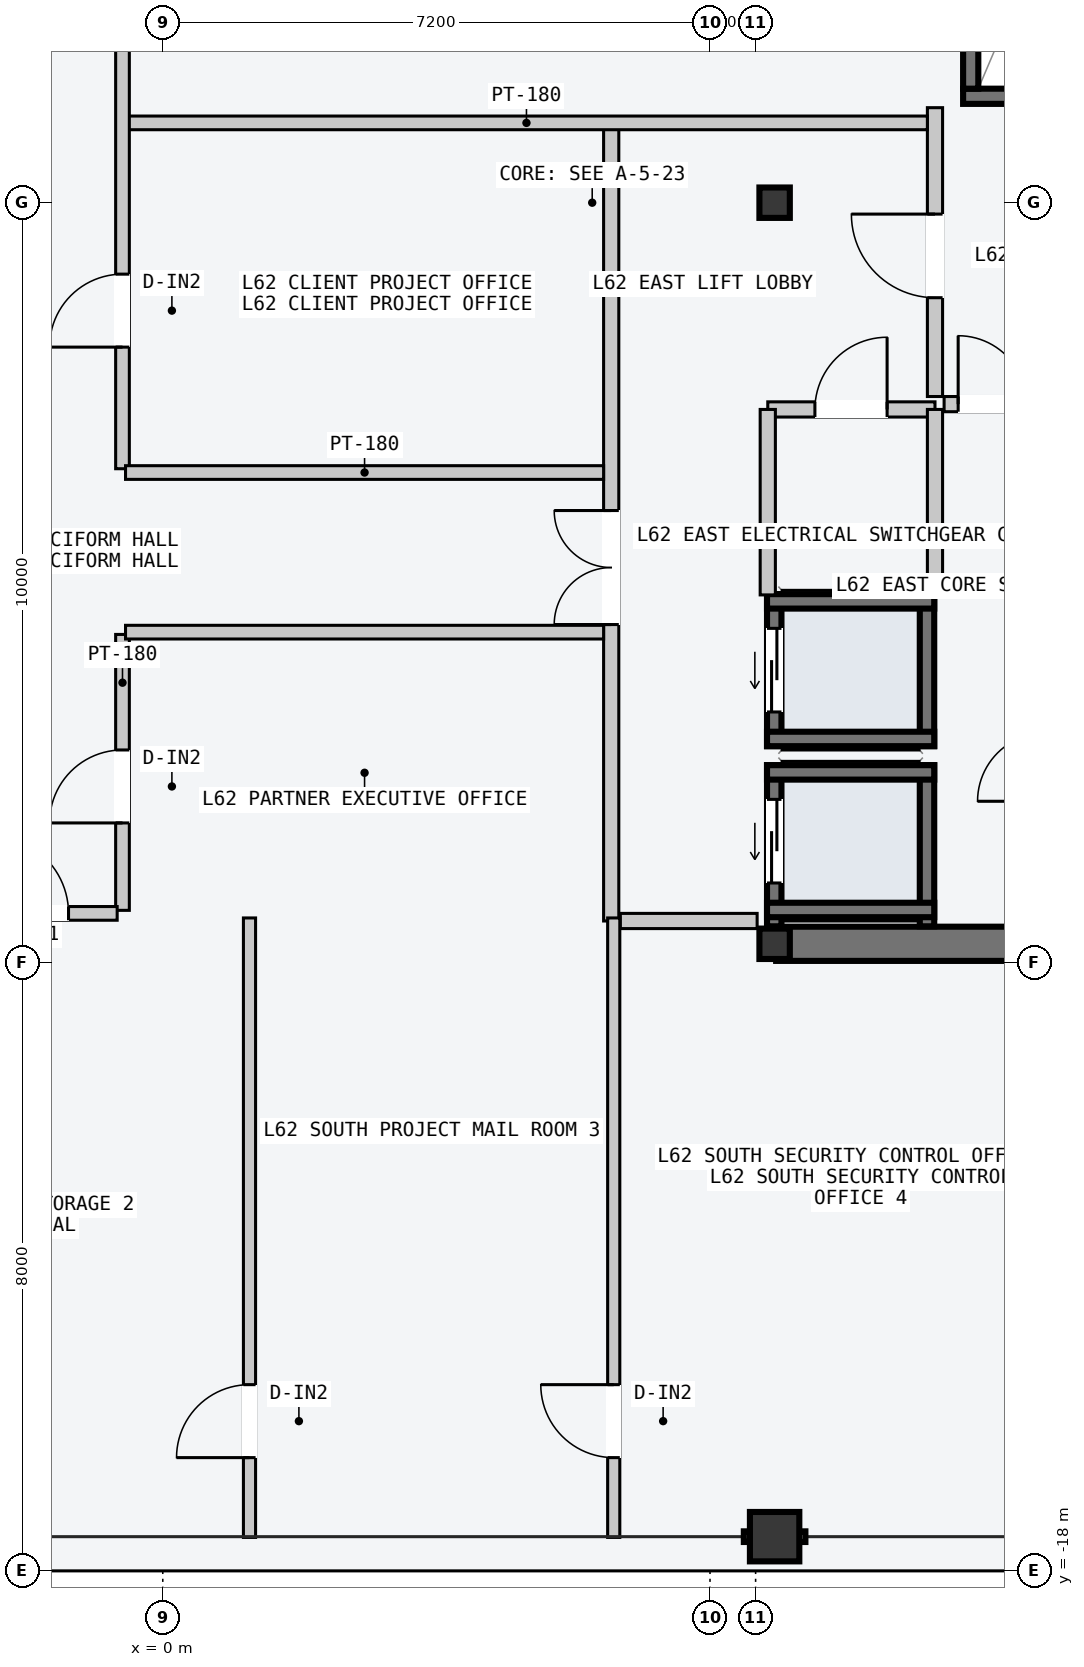
"""IFC4 building model, lengths in metres.
Left out: names, types, materials, properties, quantities, classifications, styles, units other than length and angle.
Written with IfcOpenShell. Run it as: python <this file> out.ifc"""

import sys

from ifc_helpers import new_model, si_unit, direction, frame, frame_2d, origin, origin_2d, place, context, subcontext, project, spatial, rectangle, hollow_rectangle, i_section, extrude, element, fill, save


model = new_model("IFC4")
c1 = context("Model", 3, precision=1e-05, world=origin(), true_north=direction((0.0, 1.0)))
c2 = subcontext(c1, "Body", "Model", "MODEL_VIEW")
j1 = project(units=[si_unit("LENGTHUNIT", "METRE"), si_unit("PLANEANGLEUNIT", "RADIAN")], contexts=[c1])
p1 = place(None, origin())
s1 = spatial("IfcSite", under=j1, at=p1, CompositionType="ELEMENT")
p2 = place(p1, origin())
s2 = spatial("IfcBuilding", under=s1, at=p2, CompositionType="ELEMENT")
p3 = place(p2, frame((0.0, 0.0, 236.4)))
s3 = spatial("IfcBuildingStorey", under=s2, at=p3, CompositionType="ELEMENT", Elevation=236.4)
p4 = place(p3, frame((8.07, -9.75, -0.2), z_axis=(0.0, 0.0, 1.0), x_axis=(1.0, 0.0, 0.0)))
e1 = element("IfcWall", 1, at=p4, inside=s3, PredefinedType="SHEAR", context=c2, shape_type="SweptSolid", body=[
    extrude(rectangle(XDim=6.46, YDim=0.45, at=frame_2d((3.23, 0.0))), origin(), (0.0, 0.0, 1.0), 3.6),
])
p5 = place(p3, frame((10.53, 1.4, -0.2), z_axis=(0.0, 0.0, 1.0), x_axis=(1.0, 0.0, 0.0)))
e2 = element("IfcWall", 2, at=p5, inside=s3, PredefinedType="SOLIDWALL", context=c2, shape_type="SweptSolid", body=[
    extrude(rectangle(XDim=3.72, YDim=0.2, at=frame_2d((1.86, 0.0))), origin(), (0.0, 0.0, 1.0), 3.6),
])
p6 = place(p5, frame((1.5, 0.0, 0.2)))
e3 = element("IfcOpeningElement", 3, at=p6, cuts=e2, PredefinedType="OPENING", context=c2, shape_type="SweptSolid", body=[
    extrude(rectangle(XDim=1.12, YDim=2.18, at=frame_2d((0.56, 1.09))), frame((0.0, 0.11, 0.0), z_axis=(0.0, -1.0, 0.0), x_axis=(1.0, 0.0, 0.0)), (0.0, 0.0, 1.0), 0.22),
])
p7 = place(p3, frame((10.63, 1.5, -0.2), z_axis=(0.0, 0.0, 1.0), x_axis=(0.0, 1.0, 0.0)))
e4 = element("IfcWall", 4, at=p7, inside=s3, PredefinedType="SOLIDWALL", context=c2, shape_type="SweptSolid", body=[
    extrude(rectangle(XDim=7.8, YDim=0.2, at=frame_2d((3.9, 0.0))), origin(), (0.0, 0.0, 1.0), 3.6),
])
for number, where, z_axis, x_axis in (
    (5, (8.05, -9.75, 0.0), (0.0, 0.0, 1.0), (1.0, 0.0, 0.0)),
    (6, (8.05, 0.0, 0.0), (0.0, 0.0, 1.0), (1.0, 0.0, 0.0)),
):
    element("IfcColumn", number, at=place(p3, frame(where, z_axis=z_axis, x_axis=x_axis)), inside=s3, PredefinedType="COLUMN", context=c2, shape_type="SweptSolid", body=[
        extrude(i_section(OverallWidth=0.4, OverallDepth=0.4, WebThickness=0.013, FlangeThickness=0.021, at=origin_2d()), origin(), (0.0, 0.0, 1.0), 3.6),
    ])
p8 = place(p3, frame((8.05, -17.55, 0.0), z_axis=(0.0, 0.0, 1.0), x_axis=(1.0, 0.0, 0.0)))
e7 = element("IfcColumn", 7, at=p8, inside=s3, PredefinedType="COLUMN", context=c2, shape_type="SweptSolid", body=[
    extrude(hollow_rectangle(XDim=0.65, YDim=0.65, WallThickness=0.028, at=origin_2d()), origin(), (0.0, 0.0, 1.0), 3.6),
])
p9 = place(p3, frame((8.045, -9.52, -0.2), z_axis=(0.0, 0.0, 1.0), x_axis=(0.0, 1.0, 0.0)))
e8 = element("IfcWall", 8, at=p9, inside=s3, PredefinedType="SOLIDWALL", context=c2, shape_type="SweptSolid", body=[
    extrude(rectangle(XDim=2.12, YDim=0.19, at=frame_2d((1.06, 0.0))), origin(), (0.0, 0.0, 1.0), 3.6),
])
p10 = place(p9, frame((0.57, 0.0, 0.2)))
e9 = element("IfcOpeningElement", 9, at=p10, cuts=e8, PredefinedType="OPENING", context=c2, shape_type="SweptSolid", body=[
    extrude(rectangle(XDim=1.1, YDim=2.2, at=frame_2d((0.55, 1.1))), frame((0.0, 0.105, 0.0), z_axis=(0.0, -1.0, 0.0), x_axis=(1.0, 0.0, 0.0)), (0.0, 0.0, 1.0), 0.21),
])
p11 = place(p3, frame((10.055, -9.52, -0.2), z_axis=(0.0, 0.0, 1.0), x_axis=(0.0, 1.0, 0.0)))
e10 = element("IfcWall", 10, at=p11, inside=s3, PredefinedType="SOLIDWALL", context=c2, shape_type="SweptSolid", body=[
    extrude(rectangle(XDim=2.12, YDim=0.19, at=frame_2d((1.06, 0.0))), origin(), (0.0, 0.0, 1.0), 3.6),
])
for number, where, z_axis, x_axis in (
    (11, (7.95, -7.495, -0.2), (0.0, 0.0, 1.0), (1.0, 0.0, 0.0)),
    (12, (7.95, -9.305, -0.2), (0.0, 0.0, 1.0), (1.0, 0.0, 0.0)),
):
    element("IfcWall", number, at=place(p3, frame(where, z_axis=z_axis, x_axis=x_axis)), inside=s3, PredefinedType="SOLIDWALL", context=c2, shape_type="SweptSolid", body=[
        extrude(rectangle(XDim=2.2, YDim=0.19, at=frame_2d((1.1, 0.0))), origin(), (0.0, 0.0, 1.0), 3.6),
    ])
p12 = place(p3, frame((8.045, -7.15, -0.2), z_axis=(0.0, 0.0, 1.0), x_axis=(0.0, 1.0, 0.0)))
e13 = element("IfcWall", 13, at=p12, inside=s3, PredefinedType="SOLIDWALL", context=c2, shape_type="SweptSolid", body=[
    extrude(rectangle(XDim=2.0, YDim=0.19, at=frame_2d((1.0, 0.0))), origin(), (0.0, 0.0, 1.0), 3.6),
])
p13 = place(p12, frame((0.45, 0.0, 0.2)))
e14 = element("IfcOpeningElement", 14, at=p13, cuts=e13, PredefinedType="OPENING", context=c2, shape_type="SweptSolid", body=[
    extrude(rectangle(XDim=1.1, YDim=2.2, at=frame_2d((0.55, 1.1))), frame((0.0, 0.105, 0.0), z_axis=(0.0, -1.0, 0.0), x_axis=(1.0, 0.0, 0.0)), (0.0, 0.0, 1.0), 0.21),
])
p14 = place(p3, frame((10.055, -7.15, -0.2), z_axis=(0.0, 0.0, 1.0), x_axis=(0.0, 1.0, 0.0)))
e15 = element("IfcWall", 15, at=p14, inside=s3, PredefinedType="SOLIDWALL", context=c2, shape_type="SweptSolid", body=[
    extrude(rectangle(XDim=2.0, YDim=0.19, at=frame_2d((1.0, 0.0))), origin(), (0.0, 0.0, 1.0), 3.6),
])
for number, where, z_axis, x_axis in (
    (16, (7.95, -5.245, -0.2), (0.0, 0.0, 1.0), (1.0, 0.0, 0.0)),
    (17, (7.95, -7.055, -0.2), (0.0, 0.0, 1.0), (1.0, 0.0, 0.0)),
):
    element("IfcWall", number, at=place(p3, frame(where, z_axis=z_axis, x_axis=x_axis)), inside=s3, PredefinedType="SOLIDWALL", context=c2, shape_type="SweptSolid", body=[
        extrude(rectangle(XDim=2.2, YDim=0.19, at=frame_2d((1.1, 0.0))), origin(), (0.0, 0.0, 1.0), 3.6),
    ])
p15 = place(p3, frame((5.9, -9.45, 0.0), z_axis=(0.0, 0.0, 1.0), x_axis=(0.0, 1.0, 0.0)))
e18 = element("IfcWall", 18, at=p15, inside=s3, PredefinedType="PARTITIONING", context=c2, shape_type="SweptSolid", body=[
    extrude(rectangle(XDim=10.5, YDim=0.2, at=frame_2d((5.25, 0.0))), origin(), (0.0, 0.0, 1.0), 3.4),
])
p16 = place(p15, frame((3.9, 0.0, 0.0)))
e19 = element("IfcOpeningElement", 19, at=p16, cuts=e18, PredefinedType="OPENING", context=c2, shape_type="SweptSolid", body=[
    extrude(rectangle(XDim=1.5, YDim=2.2, at=frame_2d((0.75, 1.1))), frame((0.0, 0.11, 0.0), z_axis=(0.0, -1.0, 0.0), x_axis=(1.0, 0.0, 0.0)), (0.0, 0.0, 1.0), 0.22),
])
p17 = place(p3, frame((6.02, -9.45, 0.0), z_axis=(0.0, 0.0, 1.0), x_axis=(1.0, 0.0, 0.0)))
e20 = element("IfcWall", 20, at=p17, inside=s3, PredefinedType="PARTITIONING", context=c2, shape_type="SweptSolid", body=[
    extrude(rectangle(XDim=1.8, YDim=0.2, at=frame_2d((0.9, 0.0))), origin(), (0.0, 0.0, 1.0), 3.4),
])
p18 = place(p3, frame((10.16, -2.55, 0.0), z_axis=(0.0, 0.0, 1.0), x_axis=(0.0, 1.0, 0.0)))
e21 = element("IfcWall", 21, at=p18, inside=s3, PredefinedType="PARTITIONING", context=c2, shape_type="SweptSolid", body=[
    extrude(rectangle(XDim=3.8, YDim=0.2, at=frame_2d((1.9, 0.0))), origin(), (0.0, 0.0, 1.0), 3.4),
])
p19 = place(p18, frame((1.3, 0.0, 0.0)))
e22 = element("IfcOpeningElement", 22, at=p19, cuts=e21, PredefinedType="OPENING", context=c2, shape_type="SweptSolid", body=[
    extrude(rectangle(XDim=1.1, YDim=2.15, at=frame_2d((0.55, 1.075))), frame((0.0, 0.11, 0.0), z_axis=(0.0, -1.0, 0.0), x_axis=(1.0, 0.0, 0.0)), (0.0, 0.0, 1.0), 0.22),
])
p20 = place(p3, frame((10.28, -2.65, 0.0), z_axis=(0.0, 0.0, 1.0), x_axis=(1.0, 0.0, 0.0)))
e23 = element("IfcWall", 23, at=p20, inside=s3, PredefinedType="PARTITIONING", context=c2, shape_type="SweptSolid", body=[
    extrude(rectangle(XDim=1.27, YDim=0.2, at=frame_2d((0.635, 0.0))), origin(), (0.0, 0.0, 1.0), 3.4),
])
p21 = place(p20, frame((0.185, 0.0, 0.0)))
e24 = element("IfcOpeningElement", 24, at=p21, cuts=e23, PredefinedType="OPENING", context=c2, shape_type="SweptSolid", body=[
    extrude(rectangle(XDim=0.9, YDim=2.15, at=frame_2d((0.45, 1.075))), frame((0.0, 0.11, 0.0), z_axis=(0.0, -1.0, 0.0), x_axis=(1.0, 0.0, 0.0)), (0.0, 0.0, 1.0), 0.22),
])
p22 = place(p3, frame((7.96, -2.72, 0.0), z_axis=(0.0, 0.0, 1.0), x_axis=(1.0, 0.0, 0.0)))
e25 = element("IfcWall", 25, at=p22, inside=s3, PredefinedType="PARTITIONING", context=c2, shape_type="SweptSolid", body=[
    extrude(rectangle(XDim=2.2, YDim=0.2, at=frame_2d((1.1, 0.0))), origin(), (0.0, 0.0, 1.0), 3.4),
])
p23 = place(p22, frame((0.62, 0.0, 0.0)))
e26 = element("IfcOpeningElement", 26, at=p23, cuts=e25, PredefinedType="OPENING", context=c2, shape_type="SweptSolid", body=[
    extrude(rectangle(XDim=0.95, YDim=2.1, at=frame_2d((0.475, 1.05))), frame((0.0, 0.11, 0.0), z_axis=(0.0, -1.0, 0.0), x_axis=(1.0, 0.0, 0.0)), (0.0, 0.0, 1.0), 0.22),
])
for number, where, z_axis, x_axis in (
    (27, (7.96, -5.16, 0.0), (0.0, 0.0, 1.0), (0.0, 1.0, 0.0)),
    (28, (10.16, -5.16, 0.0), (0.0, 0.0, 1.0), (0.0, 1.0, 0.0)),
):
    element("IfcWall", number, at=place(p3, frame(where, z_axis=z_axis, x_axis=x_axis)), inside=s3, PredefinedType="PARTITIONING", context=c2, shape_type="SweptSolid", body=[
        extrude(rectangle(XDim=2.44, YDim=0.2, at=frame_2d((1.22, 0.0))), origin(), (0.0, 0.0, 1.0), 3.4),
    ])
p24 = place(p3, frame((-0.49, 1.05, 0.0), z_axis=(0.0, 0.0, 1.0), x_axis=(1.0, 0.0, 0.0)))
e29 = element("IfcWall", 29, at=p24, inside=s3, PredefinedType="PARTITIONING", context=c2, shape_type="SweptSolid", body=[
    extrude(rectangle(XDim=10.55, YDim=0.18, at=frame_2d((5.275, 0.0))), origin(), (0.0, 0.0, 1.0), 3.4),
])
p25 = place(p3, frame((-0.53, -3.5, 0.0), z_axis=(0.0, 0.0, 1.0), x_axis=(0.0, 1.0, 0.0)))
e30 = element("IfcWall", 30, at=p25, inside=s3, PredefinedType="PARTITIONING", context=c2, shape_type="SweptSolid", body=[
    extrude(rectangle(XDim=13.67, YDim=0.18, at=frame_2d((6.835, 0.0))), origin(), (0.0, 0.0, 1.0), 3.4),
])
p26 = place(p25, frame((6.1, 0.0, 0.0)))
e31 = element("IfcOpeningElement", 31, at=p26, cuts=e30, PredefinedType="OPENING", context=c2, shape_type="SweptSolid", body=[
    extrude(rectangle(XDim=1.24, YDim=2.24, at=frame_2d((0.62, 1.12))), frame((0.0, 0.1, 0.0), z_axis=(0.0, -1.0, 0.0), x_axis=(1.0, 0.0, 0.0)), (0.0, 0.0, 1.0), 0.2),
])
p27 = place(p25, frame((1.6, 0.0, 0.0)))
e32 = element("IfcOpeningElement", 32, at=p27, cuts=e30, PredefinedType="OPENING", context=c2, shape_type="SweptSolid", body=[
    extrude(rectangle(XDim=0.96, YDim=2.18, at=frame_2d((0.48, 1.09))), frame((0.0, 0.1, 0.0), z_axis=(0.0, -1.0, 0.0), x_axis=(1.0, 0.0, 0.0)), (0.0, 0.0, 1.0), 0.2),
])
p28 = place(p3, frame((-0.49, -3.55, 0.0), z_axis=(0.0, 0.0, 1.0), x_axis=(1.0, 0.0, 0.0)))
e33 = element("IfcWall", 33, at=p28, inside=s3, PredefinedType="PARTITIONING", context=c2, shape_type="SweptSolid", body=[
    extrude(rectangle(XDim=6.29, YDim=0.18, at=frame_2d((3.145, 0.0))), origin(), (0.0, 0.0, 1.0), 3.4),
])
p29 = place(p3, frame((-0.53, -9.31, 0.0), z_axis=(0.0, 0.0, 1.0), x_axis=(0.0, 1.0, 0.0)))
e34 = element("IfcWall", 34, at=p29, inside=s3, PredefinedType="PARTITIONING", context=c2, shape_type="SweptSolid", body=[
    extrude(rectangle(XDim=3.63, YDim=0.18, at=frame_2d((1.815, 0.0))), origin(), (0.0, 0.0, 1.0), 3.4),
])
p30 = place(p29, frame((1.15, 0.0, 0.0)))
e35 = element("IfcOpeningElement", 35, at=p30, cuts=e34, PredefinedType="OPENING", context=c2, shape_type="SweptSolid", body=[
    extrude(rectangle(XDim=0.96, YDim=2.18, at=frame_2d((0.48, 1.09))), frame((0.0, 0.1, 0.0), z_axis=(0.0, -1.0, 0.0), x_axis=(1.0, 0.0, 0.0)), (0.0, 0.0, 1.0), 0.2),
])
p31 = place(p3, frame((-0.49, -5.65, 0.0), z_axis=(0.0, 0.0, 1.0), x_axis=(1.0, 0.0, 0.0)))
e36 = element("IfcWall", 36, at=p31, inside=s3, PredefinedType="PARTITIONING", context=c2, shape_type="SweptSolid", body=[
    extrude(rectangle(XDim=6.29, YDim=0.18, at=frame_2d((3.145, 0.0))), origin(), (0.0, 0.0, 1.0), 3.4),
])
p32 = place(p3, frame((1.141, -17.56, 0.0), z_axis=(0.0, 0.0, 1.0), x_axis=(0.0, 1.0, 0.0)))
e37 = element("IfcWall", 37, at=p32, inside=s3, PredefinedType="PARTITIONING", context=c2, shape_type="SweptSolid", body=[
    extrude(rectangle(XDim=8.15, YDim=0.16, at=frame_2d((4.075, 0.0))), origin(), (0.0, 0.0, 1.0), 3.4),
])
p33 = place(p32, frame((1.05, 0.0, 0.0)))
e38 = element("IfcOpeningElement", 38, at=p33, cuts=e37, PredefinedType="OPENING", context=c2, shape_type="SweptSolid", body=[
    extrude(rectangle(XDim=0.96, YDim=2.18, at=frame_2d((0.48, 1.09))), frame((0.0, 0.09, 0.0), z_axis=(0.0, -1.0, 0.0), x_axis=(1.0, 0.0, 0.0)), (0.0, 0.0, 1.0), 0.18),
])
p34 = place(p3, frame((5.933, -17.56, 0.0), z_axis=(0.0, 0.0, 1.0), x_axis=(0.0, 1.0, 0.0)))
e39 = element("IfcWall", 39, at=p34, inside=s3, PredefinedType="PARTITIONING", context=c2, shape_type="SweptSolid", body=[
    extrude(rectangle(XDim=8.15, YDim=0.16, at=frame_2d((4.075, 0.0))), origin(), (0.0, 0.0, 1.0), 3.4),
])
p35 = place(p34, frame((1.05, 0.0, 0.0)))
e40 = element("IfcOpeningElement", 40, at=p35, cuts=e39, PredefinedType="OPENING", context=c2, shape_type="SweptSolid", body=[
    extrude(rectangle(XDim=0.96, YDim=2.18, at=frame_2d((0.48, 1.09))), frame((0.0, 0.09, 0.0), z_axis=(0.0, -1.0, 0.0), x_axis=(1.0, 0.0, 0.0)), (0.0, 0.0, 1.0), 0.18),
])
p36 = place(p3, frame((-2.9, -9.35, 0.0), z_axis=(0.0, 0.0, 1.0), x_axis=(1.0, 0.0, 0.0)))
e41 = element("IfcWall", 41, at=p36, inside=s3, PredefinedType="PARTITIONING", context=c2, shape_type="SweptSolid", body=[
    extrude(rectangle(XDim=2.3, YDim=0.18, at=frame_2d((1.15, 0.0))), origin(), (0.0, 0.0, 1.0), 3.4),
])
p37 = place(p36, frame((0.64, 0.0, 0.0)))
e42 = element("IfcOpeningElement", 42, at=p37, cuts=e41, PredefinedType="OPENING", context=c2, shape_type="SweptSolid", body=[
    extrude(rectangle(XDim=1.02, YDim=2.2, at=frame_2d((0.51, 1.1))), frame((0.0, 0.1, 0.0), z_axis=(0.0, -1.0, 0.0), x_axis=(1.0, 0.0, 0.0)), (0.0, 0.0, 1.0), 0.2),
])
p38 = place(p10, origin())
e43 = element("IfcDoor", 43, at=p38, inside=s3, OperationType="SLIDING_TO_LEFT", PredefinedType="DOOR", context=c2, shape_type="SweptSolid", body=[
    extrude(rectangle(XDim=1.1, YDim=2.2, at=frame_2d((0.55, 1.1))), frame((0.0, 0.025, 0.0), z_axis=(0.0, -1.0, 0.0), x_axis=(1.0, 0.0, 0.0)), (0.0, 0.0, 1.0), 0.05),
])
fill(e9, e43)
p39 = place(p13, origin())
e44 = element("IfcDoor", 44, at=p39, inside=s3, OperationType="SLIDING_TO_LEFT", PredefinedType="DOOR", context=c2, shape_type="SweptSolid", body=[
    extrude(rectangle(XDim=1.1, YDim=2.2, at=frame_2d((0.55, 1.1))), frame((0.0, 0.025, 0.0), z_axis=(0.0, -1.0, 0.0), x_axis=(1.0, 0.0, 0.0)), (0.0, 0.0, 1.0), 0.05),
])
fill(e14, e44)
p40 = place(p16, origin())
e45 = element("IfcDoor", 45, at=p40, inside=s3, OperationType="DOUBLE_DOOR_SINGLE_SWING", PredefinedType="DOOR", context=c2, shape_type="SweptSolid", body=[
    extrude(rectangle(XDim=1.5, YDim=2.2, at=frame_2d((0.75, 1.1))), frame((0.0, 0.025, 0.0), z_axis=(0.0, -1.0, 0.0), x_axis=(1.0, 0.0, 0.0)), (0.0, 0.0, 1.0), 0.05),
])
fill(e19, e45)
p41 = place(p19, origin())
e46 = element("IfcDoor", 46, at=p41, inside=s3, OperationType="SINGLE_SWING_RIGHT", PredefinedType="DOOR", context=c2, shape_type="SweptSolid", body=[
    extrude(rectangle(XDim=1.1, YDim=2.15, at=frame_2d((0.55, 1.075))), frame((0.0, 0.025, 0.0), z_axis=(0.0, -1.0, 0.0), x_axis=(1.0, 0.0, 0.0)), (0.0, 0.0, 1.0), 0.05),
])
fill(e22, e46)
p42 = place(p21, origin())
e47 = element("IfcDoor", 47, at=p42, inside=s3, OperationType="SINGLE_SWING_LEFT", PredefinedType="DOOR", context=c2, shape_type="SweptSolid", body=[
    extrude(rectangle(XDim=0.9, YDim=2.15, at=frame_2d((0.45, 1.075))), frame((0.0, 0.025, 0.0), z_axis=(0.0, -1.0, 0.0), x_axis=(1.0, 0.0, 0.0)), (0.0, 0.0, 1.0), 0.05),
])
fill(e24, e47)
p43 = place(p23, origin())
e48 = element("IfcDoor", 48, at=p43, inside=s3, OperationType="SINGLE_SWING_RIGHT", PredefinedType="DOOR", context=c2, shape_type="SweptSolid", body=[
    extrude(rectangle(XDim=0.95, YDim=2.1, at=frame_2d((0.475, 1.05))), frame((0.0, 0.025, 0.0), z_axis=(0.0, -1.0, 0.0), x_axis=(1.0, 0.0, 0.0)), (0.0, 0.0, 1.0), 0.05),
])
fill(e26, e48)
p44 = place(p27, origin())
e49 = element("IfcDoor", 49, at=p44, inside=s3, OperationType="SINGLE_SWING_LEFT", PredefinedType="DOOR", context=c2, shape_type="SweptSolid", body=[
    extrude(rectangle(XDim=0.96, YDim=2.18, at=frame_2d((0.48, 1.09))), frame((0.0, 0.025, 0.0), z_axis=(0.0, -1.0, 0.0), x_axis=(1.0, 0.0, 0.0)), (0.0, 0.0, 1.0), 0.05),
])
fill(e32, e49)
p45 = place(p30, origin())
e50 = element("IfcDoor", 50, at=p45, inside=s3, OperationType="SINGLE_SWING_LEFT", PredefinedType="DOOR", context=c2, shape_type="SweptSolid", body=[
    extrude(rectangle(XDim=0.96, YDim=2.18, at=frame_2d((0.48, 1.09))), frame((0.0, 0.025, 0.0), z_axis=(0.0, -1.0, 0.0), x_axis=(1.0, 0.0, 0.0)), (0.0, 0.0, 1.0), 0.05),
])
fill(e35, e50)
p46 = place(p33, origin())
e51 = element("IfcDoor", 51, at=p46, inside=s3, OperationType="SINGLE_SWING_LEFT", PredefinedType="DOOR", context=c2, shape_type="SweptSolid", body=[
    extrude(rectangle(XDim=0.96, YDim=2.18, at=frame_2d((0.48, 1.09))), frame((0.0, 0.025, 0.0), z_axis=(0.0, -1.0, 0.0), x_axis=(1.0, 0.0, 0.0)), (0.0, 0.0, 1.0), 0.05),
])
fill(e38, e51)
p47 = place(p35, origin())
e52 = element("IfcDoor", 52, at=p47, inside=s3, OperationType="SINGLE_SWING_RIGHT", PredefinedType="DOOR", context=c2, shape_type="SweptSolid", body=[
    extrude(rectangle(XDim=0.96, YDim=2.18, at=frame_2d((0.48, 1.09))), frame((0.0, 0.025, 0.0), z_axis=(0.0, -1.0, 0.0), x_axis=(1.0, 0.0, 0.0)), (0.0, 0.0, 1.0), 0.05),
])
fill(e40, e52)
p48 = place(p37, origin())
e53 = element("IfcDoor", 53, at=p48, inside=s3, OperationType="SINGLE_SWING_LEFT", PredefinedType="DOOR", context=c2, shape_type="SweptSolid", body=[
    extrude(rectangle(XDim=1.02, YDim=2.2, at=frame_2d((0.51, 1.1))), frame((0.0, 0.025, 0.0), z_axis=(0.0, -1.0, 0.0), x_axis=(1.0, 0.0, 0.0)), (0.0, 0.0, 1.0), 0.05),
])
fill(e42, e53)
save(model, sys.argv[1])
